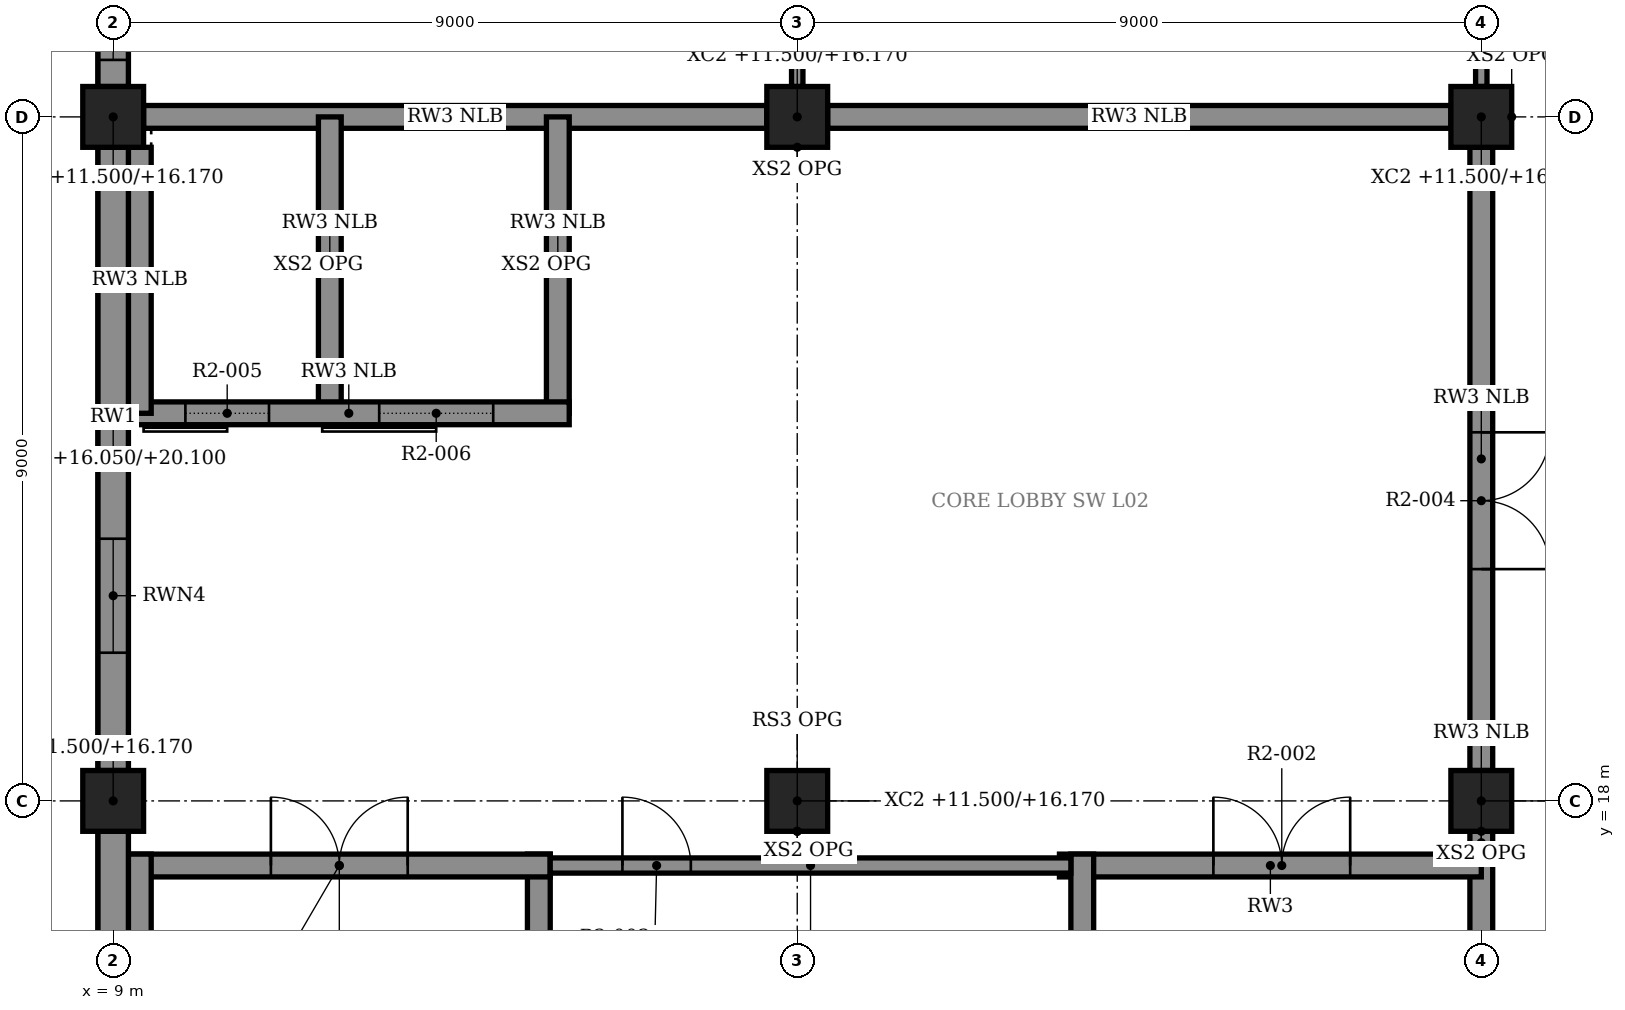
"""IFC4 building model, lengths in metres.
Left out: names, types, materials, properties, quantities, classifications, styles, units other than length and angle.
Written with IfcOpenShell. Run it as: python <this file> out.ifc"""

import sys

from ifc_helpers import new_model, si_unit, direction, frame, frame_2d, origin, origin_2d, place, context, subcontext, project, spatial, rectangle, extrude, element, fill, save


model = new_model("IFC4")
c1 = context("Model", 3, precision=1e-05, world=origin(), true_north=direction((0.0, 1.0)))
c2 = subcontext(c1, "Body", "Model", "MODEL_VIEW")
j1 = project(units=[si_unit("LENGTHUNIT", "METRE"), si_unit("PLANEANGLEUNIT", "RADIAN")], contexts=[c1])
p1 = place(None, origin())
s1 = spatial("IfcSite", under=j1, at=p1, CompositionType="ELEMENT")
p2 = place(p1, origin())
s2 = spatial("IfcBuilding", under=s1, at=p2, CompositionType="ELEMENT")
p3 = place(p2, frame((0.0, 0.0, 11.5)))
s3 = spatial("IfcBuildingStorey", under=s2, at=p3, CompositionType="ELEMENT", Elevation=11.5)
for number, where, z_axis, x_axis in (
    (1, (9.0, 18.0, 0.0), (0.0, 0.0, 1.0), (1.0, 0.0, 0.0)),
    (2, (9.0, 27.0, 0.0), (0.0, 0.0, 1.0), (1.0, 0.0, 0.0)),
    (3, (18.0, 18.0, 0.0), (0.0, 0.0, 1.0), (1.0, 0.0, 0.0)),
    (4, (18.0, 27.0, 0.0), (0.0, 0.0, 1.0), (1.0, 0.0, 0.0)),
    (5, (27.0, 18.0, 0.0), (0.0, 0.0, 1.0), (1.0, 0.0, 0.0)),
    (6, (27.0, 27.0, 0.0), (0.0, 0.0, 1.0), (1.0, 0.0, 0.0)),
):
    element("IfcColumn", number, at=place(p3, frame(where, z_axis=z_axis, x_axis=x_axis)), inside=s3, PredefinedType="COLUMN", context=c2, shape_type="SweptSolid", body=[
        extrude(rectangle(XDim=0.8, YDim=0.8, at=origin_2d()), origin(), (0.0, 0.0, 1.0), 4.67),
    ])
for number, where, z_axis, x_axis in (
    (7, (9.0, 9.0, 4.55), (0.0, 0.0, 1.0), (0.0, 1.0, 0.0)),
    (8, (9.0, 18.0, 4.55), (0.0, 0.0, 1.0), (0.0, 1.0, 0.0)),
    (9, (9.0, 27.0, 4.55), (0.0, 0.0, 1.0), (0.0, 1.0, 0.0)),
):
    element("IfcWall", number, at=place(p3, frame(where, z_axis=z_axis, x_axis=x_axis)), inside=s3, PredefinedType="SOLIDWALL", context=c2, shape_type="SweptSolid", body=[
        extrude(rectangle(XDim=9.0, YDim=0.4, at=frame_2d((4.5, 0.0))), origin(), (0.0, 0.0, 1.0), 4.05),
    ])
p4 = place(p3, frame((9.0, 9.4, 0.0), z_axis=(0.0, 0.0, 1.0), x_axis=(0.0, 1.0, 0.0)))
e10 = element("IfcWall", 10, at=p4, inside=s3, PredefinedType="SOLIDWALL", context=c2, shape_type="SweptSolid", body=[
    extrude(rectangle(XDim=8.2, YDim=0.4, at=frame_2d((4.1, 0.0))), origin(), (0.0, 0.0, 1.0), 4.55),
])
p5 = place(p3, frame((9.0, 18.4, 0.0), z_axis=(0.0, 0.0, 1.0), x_axis=(0.0, 1.0, 0.0)))
e11 = element("IfcWall", 11, at=p5, inside=s3, PredefinedType="SOLIDWALL", context=c2, shape_type="SweptSolid", body=[
    extrude(rectangle(XDim=8.2, YDim=0.4, at=frame_2d((4.1, 0.0))), origin(), (0.0, 0.0, 1.0), 4.55),
])
p6 = place(p5, frame((1.55, 0.0, 1.2)))
e12 = element("IfcOpeningElement", 12, at=p6, cuts=e11, PredefinedType="OPENING", context=c2, shape_type="SweptSolid", body=[
    extrude(rectangle(XDim=1.5, YDim=1.8, at=frame_2d((0.75, 0.9))), frame((0.0, 0.21, 0.0), z_axis=(0.0, -1.0, 0.0), x_axis=(1.0, 0.0, 0.0)), (0.0, 0.0, 1.0), 0.42),
])
p7 = place(p3, frame((9.0, 27.4, 0.0), z_axis=(0.0, 0.0, 1.0), x_axis=(0.0, 1.0, 0.0)))
e13 = element("IfcWall", 13, at=p7, inside=s3, PredefinedType="SOLIDWALL", context=c2, shape_type="SweptSolid", body=[
    extrude(rectangle(XDim=8.2, YDim=0.4, at=frame_2d((4.1, 0.0))), origin(), (0.0, 0.0, 1.0), 4.55),
])
p8 = place(p7, frame((0.35, 0.0, 0.9)))
e14 = element("IfcOpeningElement", 14, at=p8, cuts=e13, PredefinedType="OPENING", context=c2, shape_type="SweptSolid", body=[
    extrude(rectangle(XDim=1.5, YDim=2.4, at=frame_2d((0.75, 1.2))), frame((0.0, 0.21, 0.0), z_axis=(0.0, -1.0, 0.0), x_axis=(1.0, 0.0, 0.0)), (0.0, 0.0, 1.0), 0.42),
])
p9 = place(p7, frame((3.35, 0.0, 0.9)))
e15 = element("IfcOpeningElement", 15, at=p9, cuts=e13, PredefinedType="OPENING", context=c2, shape_type="SweptSolid", body=[
    extrude(rectangle(XDim=1.5, YDim=2.4, at=frame_2d((0.75, 1.2))), frame((0.0, 0.21, 0.0), z_axis=(0.0, -1.0, 0.0), x_axis=(1.0, 0.0, 0.0)), (0.0, 0.0, 1.0), 0.42),
])
p10 = place(p7, frame((6.35, 0.0, 0.9)))
e16 = element("IfcOpeningElement", 16, at=p10, cuts=e13, PredefinedType="OPENING", context=c2, shape_type="SweptSolid", body=[
    extrude(rectangle(XDim=1.5, YDim=2.4, at=frame_2d((0.75, 1.2))), frame((0.0, 0.21, 0.0), z_axis=(0.0, -1.0, 0.0), x_axis=(1.0, 0.0, 0.0)), (0.0, 0.0, 1.0), 0.42),
])
p11 = place(p3, frame((9.2, 17.15, 0.0), z_axis=(0.0, 0.0, 1.0), x_axis=(1.0, 0.0, 0.0)))
e17 = element("IfcWall", 17, at=p11, inside=s3, PredefinedType="SOLIDWALL", context=c2, shape_type="SweptSolid", body=[
    extrude(rectangle(XDim=5.55, YDim=0.3, at=frame_2d((2.775, 0.0))), origin(), (0.0, 0.0, 1.0), 4.3),
])
p12 = place(p11, frame((1.875, 0.0, 0.0)))
e18 = element("IfcOpeningElement", 18, at=p12, cuts=e17, PredefinedType="OPENING", context=c2, shape_type="SweptSolid", body=[
    extrude(rectangle(XDim=1.8, YDim=2.4, at=frame_2d((0.9, 1.2))), frame((0.0, 0.16, 0.0), z_axis=(0.0, -1.0, 0.0), x_axis=(1.0, 0.0, 0.0)), (0.0, 0.0, 1.0), 0.32),
])
p13 = place(p3, frame((9.35, 9.4, 0.0), z_axis=(0.0, 0.0, 1.0), x_axis=(0.0, 1.0, 0.0)))
e19 = element("IfcWall", 19, at=p13, inside=s3, PredefinedType="SOLIDWALL", context=c2, shape_type="SweptSolid", body=[
    extrude(rectangle(XDim=7.9, YDim=0.3, at=frame_2d((3.95, 0.0))), origin(), (0.0, 0.0, 1.0), 4.3),
])
p14 = place(p3, frame((14.6, 9.2, 0.0), z_axis=(0.0, 0.0, 1.0), x_axis=(0.0, 1.0, 0.0)))
e20 = element("IfcWall", 20, at=p14, inside=s3, PredefinedType="SOLIDWALL", context=c2, shape_type="SweptSolid", body=[
    extrude(rectangle(XDim=8.1, YDim=0.3, at=frame_2d((4.05, 0.0))), origin(), (0.0, 0.0, 1.0), 4.3),
])
p15 = place(p3, frame((21.45, 17.15, 0.0), z_axis=(0.0, 0.0, 1.0), x_axis=(1.0, 0.0, 0.0)))
e21 = element("IfcWall", 21, at=p15, inside=s3, PredefinedType="SOLIDWALL", context=c2, shape_type="SweptSolid", body=[
    extrude(rectangle(XDim=5.55, YDim=0.3, at=frame_2d((2.775, 0.0))), origin(), (0.0, 0.0, 1.0), 4.3),
])
p16 = place(p15, frame((2.025, 0.0, 0.0)))
e22 = element("IfcOpeningElement", 22, at=p16, cuts=e21, PredefinedType="OPENING", context=c2, shape_type="SweptSolid", body=[
    extrude(rectangle(XDim=1.8, YDim=2.4, at=frame_2d((0.9, 1.2))), frame((0.0, 0.16, 0.0), z_axis=(0.0, -1.0, 0.0), x_axis=(1.0, 0.0, 0.0)), (0.0, 0.0, 1.0), 0.32),
])
p17 = place(p3, frame((21.75, 9.2, 0.0), z_axis=(0.0, 0.0, 1.0), x_axis=(0.0, 1.0, 0.0)))
e23 = element("IfcWall", 23, at=p17, inside=s3, PredefinedType="SOLIDWALL", context=c2, shape_type="SweptSolid", body=[
    extrude(rectangle(XDim=8.1, YDim=0.3, at=frame_2d((4.05, 0.0))), origin(), (0.0, 0.0, 1.0), 4.3),
])
p18 = place(p3, frame((27.0, 9.4, 0.0), z_axis=(0.0, 0.0, 1.0), x_axis=(0.0, 1.0, 0.0)))
e24 = element("IfcWall", 24, at=p18, inside=s3, PredefinedType="SOLIDWALL", context=c2, shape_type="SweptSolid", body=[
    extrude(rectangle(XDim=7.9, YDim=0.3, at=frame_2d((3.95, 0.0))), origin(), (0.0, 0.0, 1.0), 4.3),
])
p19 = place(p3, frame((14.75, 17.15, 0.0), z_axis=(0.0, 0.0, 1.0), x_axis=(1.0, 0.0, 0.0)))
e25 = element("IfcWall", 25, at=p19, inside=s3, PredefinedType="PARTITIONING", context=c2, shape_type="SweptSolid", body=[
    extrude(rectangle(XDim=6.85, YDim=0.2, at=frame_2d((3.425, 0.0))), origin(), (0.0, 0.0, 1.0), 4.3),
])
p20 = place(p19, frame((0.95, 0.0, 0.0)))
e26 = element("IfcOpeningElement", 26, at=p20, cuts=e25, PredefinedType="OPENING", context=c2, shape_type="SweptSolid", body=[
    extrude(rectangle(XDim=0.9, YDim=2.1, at=frame_2d((0.45, 1.05))), frame((0.0, 0.11, 0.0), z_axis=(0.0, -1.0, 0.0), x_axis=(1.0, 0.0, 0.0)), (0.0, 0.0, 1.0), 0.22),
])
for number, where, z_axis, x_axis in (
    (27, (9.4, 27.0, 0.0), (0.0, 0.0, 1.0), (1.0, 0.0, 0.0)),
    (28, (18.4, 27.0, 0.0), (0.0, 0.0, 1.0), (1.0, 0.0, 0.0)),
):
    element("IfcWall", number, at=place(p3, frame(where, z_axis=z_axis, x_axis=x_axis)), inside=s3, PredefinedType="SOLIDWALL", context=c2, shape_type="SweptSolid", body=[
        extrude(rectangle(XDim=8.2, YDim=0.3, at=frame_2d((4.1, 0.0))), origin(), (0.0, 0.0, 1.0), 4.3),
    ])
p21 = place(p3, frame((27.0, 17.3, 0.0), z_axis=(0.0, 0.0, 1.0), x_axis=(0.0, 1.0, 0.0)))
e29 = element("IfcWall", 29, at=p21, inside=s3, PredefinedType="SOLIDWALL", context=c2, shape_type="SweptSolid", body=[
    extrude(rectangle(XDim=0.3, YDim=0.3, at=frame_2d((0.15, 0.0))), origin(), (0.0, 0.0, 1.0), 4.3),
])
p22 = place(p3, frame((27.0, 18.4, 0.0), z_axis=(0.0, 0.0, 1.0), x_axis=(0.0, 1.0, 0.0)))
e30 = element("IfcWall", 30, at=p22, inside=s3, PredefinedType="SOLIDWALL", context=c2, shape_type="SweptSolid", body=[
    extrude(rectangle(XDim=8.2, YDim=0.3, at=frame_2d((4.1, 0.0))), origin(), (0.0, 0.0, 1.0), 4.3),
])
p23 = place(p22, frame((2.65, 0.0, 0.0)))
e31 = element("IfcOpeningElement", 31, at=p23, cuts=e30, PredefinedType="OPENING", context=c2, shape_type="SweptSolid", body=[
    extrude(rectangle(XDim=1.8, YDim=2.4, at=frame_2d((0.9, 1.2))), frame((0.0, 0.16, 0.0), z_axis=(0.0, -1.0, 0.0), x_axis=(1.0, 0.0, 0.0)), (0.0, 0.0, 1.0), 0.32),
])
p24 = place(p3, frame((9.2, 23.1, 0.0), z_axis=(0.0, 0.0, 1.0), x_axis=(1.0, 0.0, 0.0)))
e32 = element("IfcWall", 32, at=p24, inside=s3, PredefinedType="SOLIDWALL", context=c2, shape_type="SweptSolid", body=[
    extrude(rectangle(XDim=5.8, YDim=0.3, at=frame_2d((2.9, 0.0))), origin(), (0.0, 0.0, 1.0), 4.3),
])
p25 = place(p24, frame((0.75, 0.0, 0.0)))
e33 = element("IfcOpeningElement", 33, at=p25, cuts=e32, PredefinedType="OPENING", context=c2, shape_type="SweptSolid", body=[
    extrude(rectangle(XDim=1.1, YDim=2.4, at=frame_2d((0.55, 1.2))), frame((0.0, 0.16, 0.0), z_axis=(0.0, -1.0, 0.0), x_axis=(1.0, 0.0, 0.0)), (0.0, 0.0, 1.0), 0.32),
])
p26 = place(p24, frame((3.3, 0.0, 0.0)))
e34 = element("IfcOpeningElement", 34, at=p26, cuts=e32, PredefinedType="OPENING", context=c2, shape_type="SweptSolid", body=[
    extrude(rectangle(XDim=1.5, YDim=2.4, at=frame_2d((0.75, 1.2))), frame((0.0, 0.16, 0.0), z_axis=(0.0, -1.0, 0.0), x_axis=(1.0, 0.0, 0.0)), (0.0, 0.0, 1.0), 0.32),
])
for number, where, z_axis, x_axis in (
    (35, (11.85, 23.1, 0.0), (0.0, 0.0, 1.0), (0.0, 1.0, 0.0)),
    (36, (14.85, 23.1, 0.0), (0.0, 0.0, 1.0), (0.0, 1.0, 0.0)),
):
    element("IfcWall", number, at=place(p3, frame(where, z_axis=z_axis, x_axis=x_axis)), inside=s3, PredefinedType="SOLIDWALL", context=c2, shape_type="SweptSolid", body=[
        extrude(rectangle(XDim=3.9, YDim=0.3, at=frame_2d((1.95, 0.0))), origin(), (0.0, 0.0, 1.0), 4.3),
    ])
p27 = place(p3, frame((9.35, 23.1, 0.0), z_axis=(0.0, 0.0, 1.0), x_axis=(0.0, 1.0, 0.0)))
e37 = element("IfcWall", 37, at=p27, inside=s3, PredefinedType="SOLIDWALL", context=c2, shape_type="SweptSolid", body=[
    extrude(rectangle(XDim=3.5, YDim=0.3, at=frame_2d((1.75, 0.0))), origin(), (0.0, 0.0, 1.0), 4.3),
])
for number, where, z_axis, x_axis in (
    (38, (18.0, 27.4, 0.0), (0.0, 0.0, 1.0), (0.0, 1.0, 0.0)),
    (39, (27.0, 27.4, 0.0), (0.0, 0.0, 1.0), (0.0, 1.0, 0.0)),
):
    element("IfcWall", number, at=place(p3, frame(where, z_axis=z_axis, x_axis=x_axis)), inside=s3, PredefinedType="PARTITIONING", context=c2, shape_type="SweptSolid", body=[
        extrude(rectangle(XDim=8.2, YDim=0.15, at=frame_2d((4.1, 0.0))), origin(), (0.0, 0.0, 1.0), 4.55),
    ])
p28 = place(p6, origin())
e40 = element("IfcWindow", 40, at=p28, inside=s3, PartitioningType="SINGLE_PANEL", PredefinedType="WINDOW", context=c2, shape_type="SweptSolid", body=[
    extrude(rectangle(XDim=1.5, YDim=1.8, at=frame_2d((0.75, 0.9))), frame((0.0, 0.03, 0.0), z_axis=(0.0, -1.0, 0.0), x_axis=(1.0, 0.0, 0.0)), (0.0, 0.0, 1.0), 0.06),
])
fill(e12, e40)
p29 = place(p8, origin())
e41 = element("IfcWindow", 41, at=p29, inside=s3, PartitioningType="SINGLE_PANEL", PredefinedType="WINDOW", context=c2, shape_type="SweptSolid", body=[
    extrude(rectangle(XDim=1.5, YDim=2.4, at=frame_2d((0.75, 1.2))), frame((0.0, 0.03, 0.0), z_axis=(0.0, -1.0, 0.0), x_axis=(1.0, 0.0, 0.0)), (0.0, 0.0, 1.0), 0.06),
])
fill(e14, e41)
p30 = place(p12, origin())
e42 = element("IfcDoor", 42, at=p30, inside=s3, OperationType="DOUBLE_DOOR_SINGLE_SWING", PredefinedType="DOOR", context=c2, shape_type="SweptSolid", body=[
    extrude(rectangle(XDim=1.8, YDim=2.4, at=frame_2d((0.9, 1.2))), frame((0.0, 0.025, 0.0), z_axis=(0.0, -1.0, 0.0), x_axis=(1.0, 0.0, 0.0)), (0.0, 0.0, 1.0), 0.05),
])
fill(e18, e42)
p31 = place(p16, origin())
e43 = element("IfcDoor", 43, at=p31, inside=s3, OperationType="DOUBLE_DOOR_SINGLE_SWING", PredefinedType="DOOR", context=c2, shape_type="SweptSolid", body=[
    extrude(rectangle(XDim=1.8, YDim=2.4, at=frame_2d((0.9, 1.2))), frame((0.0, 0.025, 0.0), z_axis=(0.0, -1.0, 0.0), x_axis=(1.0, 0.0, 0.0)), (0.0, 0.0, 1.0), 0.05),
])
fill(e22, e43)
p32 = place(p20, origin())
e44 = element("IfcDoor", 44, at=p32, inside=s3, OperationType="SINGLE_SWING_LEFT", PredefinedType="DOOR", context=c2, shape_type="SweptSolid", body=[
    extrude(rectangle(XDim=0.9, YDim=2.1, at=frame_2d((0.45, 1.05))), frame((0.0, 0.025, 0.0), z_axis=(0.0, -1.0, 0.0), x_axis=(1.0, 0.0, 0.0)), (0.0, 0.0, 1.0), 0.05),
])
fill(e26, e44)
p33 = place(p23, frame((1.8, 0.0, 0.0), z_axis=(0.0, 0.0, 1.0), x_axis=(-1.0, 0.0, 0.0)))
e45 = element("IfcDoor", 45, at=p33, inside=s3, OperationType="DOUBLE_DOOR_SINGLE_SWING", PredefinedType="DOOR", context=c2, shape_type="SweptSolid", body=[
    extrude(rectangle(XDim=1.8, YDim=2.4, at=frame_2d((0.9, 1.2))), frame((0.0, 0.025, 0.0), z_axis=(0.0, -1.0, 0.0), x_axis=(1.0, 0.0, 0.0)), (0.0, 0.0, 1.0), 0.05),
])
fill(e31, e45)
p34 = place(p25, frame((1.1, 0.0, 0.0), z_axis=(0.0, 0.0, 1.0), x_axis=(-1.0, 0.0, 0.0)))
e46 = element("IfcDoor", 46, at=p34, inside=s3, OperationType="SLIDING_TO_LEFT", PredefinedType="DOOR", context=c2, shape_type="SweptSolid", body=[
    extrude(rectangle(XDim=1.1, YDim=2.4, at=frame_2d((0.55, 1.2))), frame((0.0, 0.025, 0.0), z_axis=(0.0, -1.0, 0.0), x_axis=(1.0, 0.0, 0.0)), (0.0, 0.0, 1.0), 0.05),
])
fill(e33, e46)
p35 = place(p26, frame((1.5, 0.0, 0.0), z_axis=(0.0, 0.0, 1.0), x_axis=(-1.0, 0.0, 0.0)))
e47 = element("IfcDoor", 47, at=p35, inside=s3, OperationType="SLIDING_TO_LEFT", PredefinedType="DOOR", context=c2, shape_type="SweptSolid", body=[
    extrude(rectangle(XDim=1.5, YDim=2.4, at=frame_2d((0.75, 1.2))), frame((0.0, 0.025, 0.0), z_axis=(0.0, -1.0, 0.0), x_axis=(1.0, 0.0, 0.0)), (0.0, 0.0, 1.0), 0.05),
])
fill(e34, e47)
save(model, sys.argv[1])
